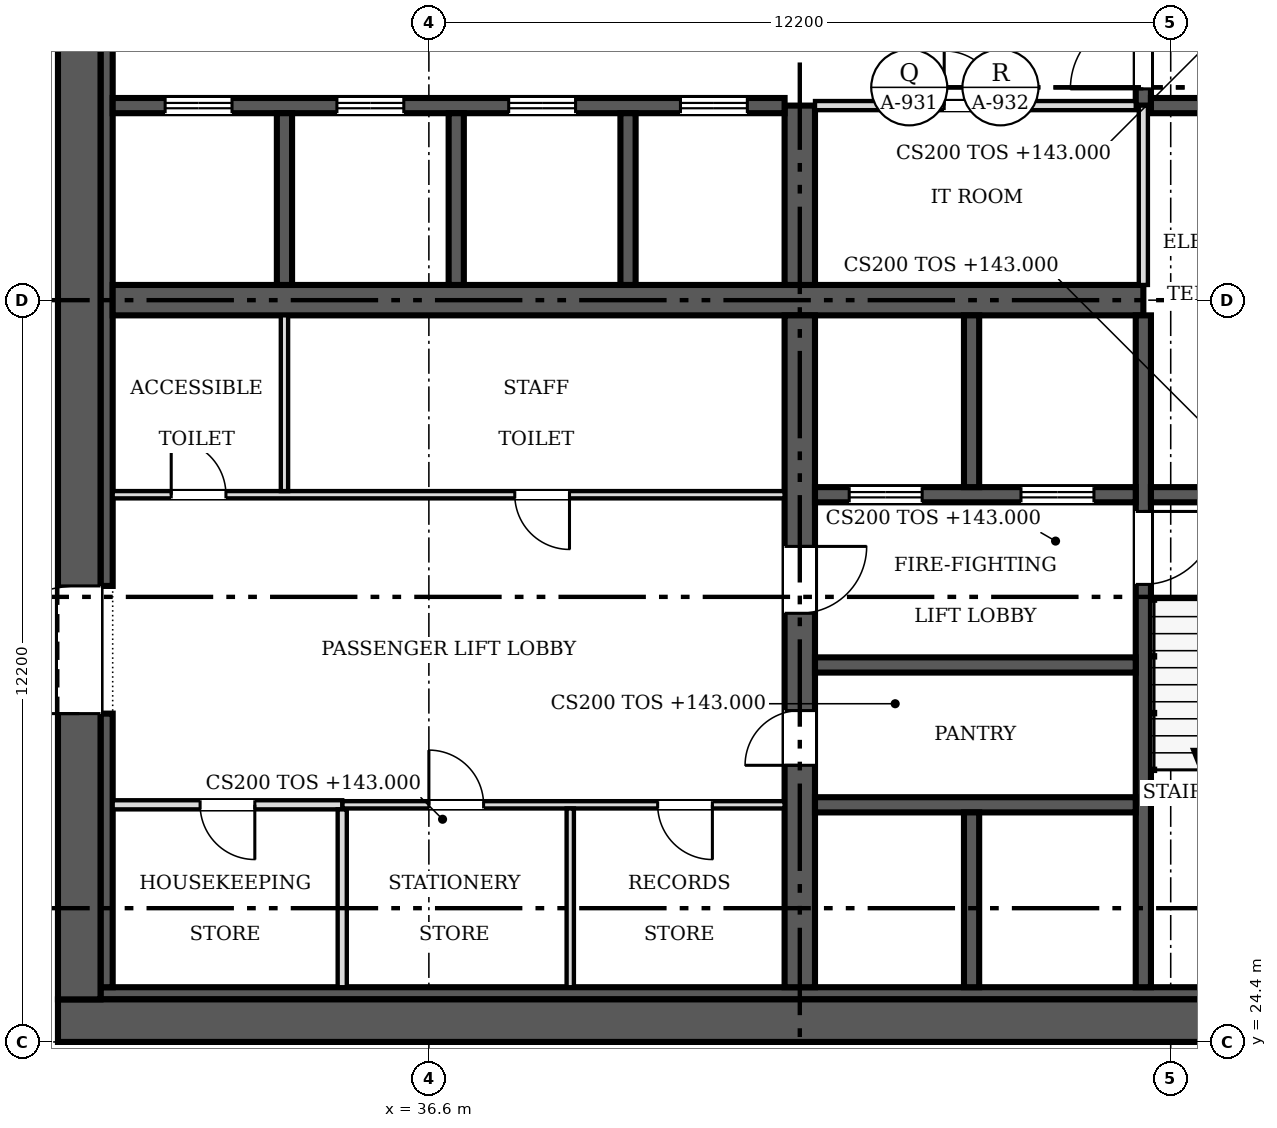
"""IFC4 building model, lengths in metres.
Left out: names, types, materials, properties, quantities, classifications, styles, units other than length and angle.
Written with IfcOpenShell. Run it as: python <this file> out.ifc"""

import sys

from ifc_helpers import new_model, si_unit, direction, frame, frame_2d, origin, place, context, subcontext, project, spatial, rectangle, extrude, source, transform, mapped, element, fill, save


model = new_model("IFC4")
c1 = context("Model", 3, precision=1e-05, world=origin(), true_north=direction((0.0, 1.0)))
c2 = subcontext(c1, "Body", "Model", "MODEL_VIEW")
j1 = project(units=[si_unit("LENGTHUNIT", "METRE"), si_unit("PLANEANGLEUNIT", "RADIAN")], contexts=[c1])
p1 = place(None, origin())
s1 = spatial("IfcSite", under=j1, at=p1, CompositionType="ELEMENT")
p2 = place(p1, origin())
s2 = spatial("IfcBuilding", under=s1, at=p2, CompositionType="ELEMENT")
p3 = place(p2, frame((0.0, 0.0, 143.0)))
s3 = spatial("IfcBuildingStorey", under=s2, at=p3, CompositionType="ELEMENT", Elevation=143.0)
p4 = place(p3, frame((54.9, 24.75, 0.0), z_axis=(0.0, 0.0, 1.0), x_axis=(-1.0, 0.0, 0.0)))
e1 = element("IfcWall", 1, at=p4, inside=s3, PredefinedType="SHEAR", context=c2, shape_type="SweptSolid", body=[
    extrude(rectangle(XDim=24.4, YDim=0.7, at=frame_2d((12.2, 0.0))), origin(), (0.0, 0.0, 1.0), 3.8),
])
m1 = source(origin(), c2, "Body", "SweptSolid", [
    extrude(rectangle(XDim=1.2, YDim=2.1, at=frame_2d((0.6, 1.05))), frame((0.0, 0.36, 0.0), z_axis=(0.0, -1.0, 0.0), x_axis=(1.0, 0.0, 0.0)), (0.0, 0.0, 1.0), 0.72),
])
p5 = place(p4, frame((1.5, 0.0, 0.0)))
e2 = element("IfcOpeningElement", 2, at=p5, cuts=e1, PredefinedType="OPENING", context=c2, shape_type="MappedRepresentation", body=[
    mapped(m1, transform((0.0, 0.0, 0.0), scale=1.0)),
])
p6 = place(p3, frame((30.85, 25.1, 0.0), z_axis=(0.0, 0.0, 1.0), x_axis=(0.0, 1.0, 0.0)))
e3 = element("IfcWall", 3, at=p6, inside=s3, PredefinedType="SHEAR", context=c2, shape_type="SweptSolid", body=[
    extrude(rectangle(XDim=23.0, YDim=0.7, at=frame_2d((11.5, 0.0))), origin(), (0.0, 0.0, 1.0), 3.8),
])
m2 = source(origin(), c2, "Body", "SweptSolid", [
    extrude(rectangle(XDim=2.1, YDim=2.4, at=frame_2d((1.05, 1.2))), frame((0.0, 0.36, 0.0), z_axis=(0.0, -1.0, 0.0), x_axis=(1.0, 0.0, 0.0)), (0.0, 0.0, 1.0), 0.72),
])
p7 = place(p6, frame((4.7, 0.0, 0.0)))
e4 = element("IfcOpeningElement", 4, at=p7, cuts=e3, PredefinedType="OPENING", context=c2, shape_type="MappedRepresentation", body=[
    mapped(m2, transform((0.0, 0.0, 0.0), scale=1.0)),
])
p8 = place(p6, frame((16.2, 0.0, 0.0)))
e5 = element("IfcOpeningElement", 5, at=p8, cuts=e3, PredefinedType="OPENING", context=c2, shape_type="MappedRepresentation", body=[
    mapped(m2, transform((0.0, 0.0, 0.0), scale=1.0)),
])
p9 = place(p3, frame((31.2, 25.2, 0.0), z_axis=(0.0, 0.0, 1.0), x_axis=(1.0, 0.0, 0.0)))
e6 = element("IfcWall", 6, at=p9, inside=s3, PredefinedType="SOLIDWALL", context=c2, shape_type="SweptSolid", body=[
    extrude(rectangle(XDim=21.0, YDim=0.2, at=frame_2d((10.5, 0.0))), origin(), (0.0, 0.0, 1.0), 3.8),
])
p10 = place(p3, frame((31.3, 25.3, 0.0), z_axis=(0.0, 0.0, 1.0), x_axis=(0.0, 1.0, 0.0)))
e7 = element("IfcWall", 7, at=p10, inside=s3, PredefinedType="SOLIDWALL", context=c2, shape_type="SweptSolid", body=[
    extrude(rectangle(XDim=4.5, YDim=0.2, at=frame_2d((2.25, 0.0))), origin(), (0.0, 0.0, 1.0), 3.8),
])
p11 = place(p3, frame((31.3, 31.9, 0.0), z_axis=(0.0, 0.0, 1.0), x_axis=(0.0, 1.0, 0.0)))
e8 = element("IfcWall", 8, at=p11, inside=s3, PredefinedType="SOLIDWALL", context=c2, shape_type="SweptSolid", body=[
    extrude(rectangle(XDim=9.4, YDim=0.2, at=frame_2d((4.7, 0.0))), origin(), (0.0, 0.0, 1.0), 3.8),
])
p12 = place(p3, frame((31.4, 36.6, 0.0), z_axis=(0.0, 0.0, 1.0), x_axis=(1.0, 0.0, 0.0)))
e9 = element("IfcWall", 9, at=p12, inside=s3, PredefinedType="SHEAR", context=c2, shape_type="SweptSolid", body=[
    extrude(rectangle(XDim=16.95, YDim=0.5, at=frame_2d((8.475, 0.0))), origin(), (0.0, 0.0, 1.0), 3.8),
])
p13 = place(p3, frame((42.7, 36.35, 0.0), z_axis=(0.0, 0.0, 1.0), x_axis=(0.0, -1.0, 0.0)))
e10 = element("IfcWall", 10, at=p13, inside=s3, PredefinedType="SHEAR", context=c2, shape_type="SweptSolid", body=[
    extrude(rectangle(XDim=11.05, YDim=0.5, at=frame_2d((5.525, 0.0))), origin(), (0.0, 0.0, 1.0), 3.8),
])
m3 = source(origin(), c2, "Body", "SweptSolid", [
    extrude(rectangle(XDim=0.9, YDim=2.1, at=frame_2d((0.45, 1.05))), frame((0.0, 0.26, 0.0), z_axis=(0.0, -1.0, 0.0), x_axis=(1.0, 0.0, 0.0)), (0.0, 0.0, 1.0), 0.52),
])
p14 = place(p13, frame((6.5, 0.0, 0.0)))
e11 = element("IfcOpeningElement", 11, at=p14, cuts=e10, PredefinedType="OPENING", context=c2, shape_type="MappedRepresentation", body=[
    mapped(m3, transform((0.0, 0.0, 0.0), scale=1.0)),
])
m4 = source(origin(), c2, "Body", "SweptSolid", [
    extrude(rectangle(XDim=1.1, YDim=2.1, at=frame_2d((0.55, 1.05))), frame((0.0, 0.26, 0.0), z_axis=(0.0, -1.0, 0.0), x_axis=(1.0, 0.0, 0.0)), (0.0, 0.0, 1.0), 0.52),
])
p15 = place(p13, frame((3.8, 0.0, 0.0)))
e12 = element("IfcOpeningElement", 12, at=p15, cuts=e10, PredefinedType="OPENING", context=c2, shape_type="MappedRepresentation", body=[
    mapped(m4, transform((0.0, 0.0, 0.0), scale=1.0)),
])
p16 = place(p3, frame((42.7, 36.85, 0.0), z_axis=(0.0, 0.0, 1.0), x_axis=(0.0, 1.0, 0.0)))
e13 = element("IfcWall", 13, at=p16, inside=s3, PredefinedType="SHEAR", context=c2, shape_type="SweptSolid", body=[
    extrude(rectangle(XDim=2.95, YDim=0.5, at=frame_2d((1.475, 0.0))), origin(), (0.0, 0.0, 1.0), 3.8),
])
p17 = place(p3, frame((31.4, 39.8, 0.0), z_axis=(0.0, 0.0, 1.0), x_axis=(1.0, 0.0, 0.0)))
e14 = element("IfcWall", 14, at=p17, inside=s3, PredefinedType="SOLIDWALL", context=c2, shape_type="SweptSolid", body=[
    extrude(rectangle(XDim=11.05, YDim=0.25, at=frame_2d((5.525, 0.0))), origin(), (0.0, 0.0, 1.0), 3.8),
])
m5 = source(origin(), c2, "Body", "SweptSolid", [
    extrude(rectangle(XDim=1.1, YDim=2.1, at=frame_2d((0.55, 1.05))), frame((0.0, 0.135, 0.0), z_axis=(0.0, -1.0, 0.0), x_axis=(1.0, 0.0, 0.0)), (0.0, 0.0, 1.0), 0.27),
])
p18 = place(p17, frame((0.863, 0.0, 0.0)))
e15 = element("IfcOpeningElement", 15, at=p18, cuts=e14, PredefinedType="OPENING", context=c2, shape_type="MappedRepresentation", body=[
    mapped(m5, transform((0.0, 0.0, 0.0), scale=1.0)),
])
p19 = place(p17, frame((3.688, 0.0, 0.0)))
e16 = element("IfcOpeningElement", 16, at=p19, cuts=e14, PredefinedType="OPENING", context=c2, shape_type="MappedRepresentation", body=[
    mapped(m5, transform((0.0, 0.0, 0.0), scale=1.0)),
])
p20 = place(p17, frame((6.512, 0.0, 0.0)))
e17 = element("IfcOpeningElement", 17, at=p20, cuts=e14, PredefinedType="OPENING", context=c2, shape_type="MappedRepresentation", body=[
    mapped(m5, transform((0.0, 0.0, 0.0), scale=1.0)),
])
p21 = place(p17, frame((9.337, 0.0, 0.0)))
e18 = element("IfcOpeningElement", 18, at=p21, cuts=e14, PredefinedType="OPENING", context=c2, shape_type="MappedRepresentation", body=[
    mapped(m5, transform((0.0, 0.0, 0.0), scale=1.0)),
])
p22 = place(p3, frame((48.35, 36.35, 0.0), z_axis=(0.0, 0.0, 1.0), x_axis=(0.0, -1.0, 0.0)))
e19 = element("IfcWall", 19, at=p22, inside=s3, PredefinedType="SOLIDWALL", context=c2, shape_type="SweptSolid", body=[
    extrude(rectangle(XDim=11.05, YDim=0.25, at=frame_2d((5.525, 0.0))), origin(), (0.0, 0.0, 1.0), 3.8),
])
m6 = source(origin(), c2, "Body", "SweptSolid", [
    extrude(rectangle(XDim=1.2, YDim=2.1, at=frame_2d((0.6, 1.05))), frame((0.0, 0.135, 0.0), z_axis=(0.0, -1.0, 0.0), x_axis=(1.0, 0.0, 0.0)), (0.0, 0.0, 1.0), 0.27),
])
p23 = place(p22, frame((3.225, 0.0, 0.0)))
e20 = element("IfcOpeningElement", 20, at=p23, cuts=e19, PredefinedType="OPENING", context=c2, shape_type="MappedRepresentation", body=[
    mapped(m6, transform((0.0, 0.0, 0.0), scale=1.0)),
])
p24 = place(p3, frame((48.225, 33.4, 0.0), z_axis=(0.0, 0.0, 1.0), x_axis=(-1.0, 0.0, 0.0)))
e21 = element("IfcWall", 21, at=p24, inside=s3, PredefinedType="SOLIDWALL", context=c2, shape_type="SweptSolid", body=[
    extrude(rectangle(XDim=5.275, YDim=0.25, at=frame_2d((2.638, 0.0))), origin(), (0.0, 0.0, 1.0), 3.8),
])
p25 = place(p24, frame((3.512, 0.0, 0.0)))
e22 = element("IfcOpeningElement", 22, at=p25, cuts=e21, PredefinedType="OPENING", context=c2, shape_type="MappedRepresentation", body=[
    mapped(m6, transform((0.0, 0.0, 0.0), scale=1.0)),
])
p26 = place(p24, frame((0.688, 0.0, 0.0)))
e23 = element("IfcOpeningElement", 23, at=p26, cuts=e21, PredefinedType="OPENING", context=c2, shape_type="MappedRepresentation", body=[
    mapped(m6, transform((0.0, 0.0, 0.0), scale=1.0)),
])
p27 = place(p3, frame((48.475, 33.4, 0.0), z_axis=(0.0, 0.0, 1.0), x_axis=(1.0, 0.0, 0.0)))
e24 = element("IfcWall", 24, at=p27, inside=s3, PredefinedType="SOLIDWALL", context=c2, shape_type="SweptSolid", body=[
    extrude(rectangle(XDim=3.525, YDim=0.25, at=frame_2d((1.762, 0.0))), origin(), (0.0, 0.0, 1.0), 3.8),
])
p28 = place(p3, frame((48.35, 47.9, 0.0), z_axis=(0.0, 0.0, 1.0), x_axis=(0.0, -1.0, 0.0)))
e25 = element("IfcWall", 25, at=p28, inside=s3, PredefinedType="SOLIDWALL", context=c2, shape_type="SweptSolid", body=[
    extrude(rectangle(XDim=8.1, YDim=0.25, at=frame_2d((4.05, 0.0))), origin(), (0.0, 0.0, 1.0), 3.8),
])
p29 = place(p28, frame((6.625, 0.0, 0.0)))
e26 = element("IfcOpeningElement", 26, at=p29, cuts=e25, PredefinedType="OPENING", context=c2, shape_type="MappedRepresentation", body=[
    mapped(m6, transform((0.0, 0.0, 0.0), scale=1.0)),
])
for number, where, z_axis, x_axis in (
    (27, (42.95, 28.3, 0.0), (0.0, 0.0, 1.0), (1.0, 0.0, 0.0)),
    (28, (42.95, 30.6, 0.0), (0.0, 0.0, 1.0), (1.0, 0.0, 0.0)),
):
    element("IfcWall", number, at=place(p3, frame(where, z_axis=z_axis, x_axis=x_axis)), inside=s3, PredefinedType="SOLIDWALL", context=c2, shape_type="SweptSolid", body=[
        extrude(rectangle(XDim=5.275, YDim=0.25, at=frame_2d((2.638, 0.0))), origin(), (0.0, 0.0, 1.0), 3.8),
    ])
p30 = place(p3, frame((48.475, 39.8, 0.0), z_axis=(0.0, 0.0, 1.0), x_axis=(1.0, 0.0, 0.0)))
e29 = element("IfcWall", 29, at=p30, inside=s3, PredefinedType="SOLIDWALL", context=c2, shape_type="SweptSolid", body=[
    extrude(rectangle(XDim=3.4, YDim=0.25, at=frame_2d((1.7, 0.0))), origin(), (0.0, 0.0, 1.0), 3.8),
])
for number, where, z_axis, x_axis in (
    (30, (34.225, 36.85, 0.0), (0.0, 0.0, 1.0), (0.0, 1.0, 0.0)),
    (31, (37.05, 36.85, 0.0), (0.0, 0.0, 1.0), (0.0, 1.0, 0.0)),
    (32, (39.875, 36.85, 0.0), (0.0, 0.0, 1.0), (0.0, 1.0, 0.0)),
):
    element("IfcWall", number, at=place(p3, frame(where, z_axis=z_axis, x_axis=x_axis)), inside=s3, PredefinedType="SOLIDWALL", context=c2, shape_type="SweptSolid", body=[
        extrude(rectangle(XDim=2.825, YDim=0.25, at=frame_2d((1.413, 0.0))), origin(), (0.0, 0.0, 1.0), 3.8),
    ])
p31 = place(p3, frame((45.525, 33.525, 0.0), z_axis=(0.0, 0.0, 1.0), x_axis=(0.0, 1.0, 0.0)))
e33 = element("IfcWall", 33, at=p31, inside=s3, PredefinedType="SOLIDWALL", context=c2, shape_type="SweptSolid", body=[
    extrude(rectangle(XDim=2.825, YDim=0.25, at=frame_2d((1.413, 0.0))), origin(), (0.0, 0.0, 1.0), 3.8),
])
p32 = place(p3, frame((45.525, 25.3, 0.0), z_axis=(0.0, 0.0, 1.0), x_axis=(0.0, 1.0, 0.0)))
e34 = element("IfcWall", 34, at=p32, inside=s3, PredefinedType="SOLIDWALL", context=c2, shape_type="SweptSolid", body=[
    extrude(rectangle(XDim=2.875, YDim=0.25, at=frame_2d((1.438, 0.0))), origin(), (0.0, 0.0, 1.0), 3.8),
])
p33 = place(p3, frame((31.4, 33.4, 0.0), z_axis=(0.0, 0.0, 1.0), x_axis=(1.0, 0.0, 0.0)))
e35 = element("IfcWall", 35, at=p33, inside=s3, PredefinedType="PARTITIONING", context=c2, shape_type="SweptSolid", body=[
    extrude(rectangle(XDim=11.05, YDim=0.12, at=frame_2d((5.525, 0.0))), origin(), (0.0, 0.0, 1.0), 3.6),
])
m7 = source(origin(), c2, "Body", "SweptSolid", [
    extrude(rectangle(XDim=0.9, YDim=2.1, at=frame_2d((0.45, 1.05))), frame((0.0, 0.07, 0.0), z_axis=(0.0, -1.0, 0.0), x_axis=(1.0, 0.0, 0.0)), (0.0, 0.0, 1.0), 0.14),
])
p34 = place(p33, frame((0.962, 0.0, 0.0)))
e36 = element("IfcOpeningElement", 36, at=p34, cuts=e35, PredefinedType="OPENING", context=c2, shape_type="MappedRepresentation", body=[
    mapped(m7, transform((0.0, 0.0, 0.0), scale=1.0)),
])
p35 = place(p33, frame((6.613, 0.0, 0.0)))
e37 = element("IfcOpeningElement", 37, at=p35, cuts=e35, PredefinedType="OPENING", context=c2, shape_type="MappedRepresentation", body=[
    mapped(m7, transform((0.0, 0.0, 0.0), scale=1.0)),
])
p36 = place(p3, frame((42.45, 28.3, 0.0), z_axis=(0.0, 0.0, 1.0), x_axis=(-1.0, 0.0, 0.0)))
e38 = element("IfcWall", 38, at=p36, inside=s3, PredefinedType="PARTITIONING", context=c2, shape_type="SweptSolid", body=[
    extrude(rectangle(XDim=7.275, YDim=0.12, at=frame_2d((3.637, 0.0))), origin(), (0.0, 0.0, 1.0), 3.6),
])
p37 = place(p36, frame((4.95, 0.0, 0.0)))
e39 = element("IfcOpeningElement", 39, at=p37, cuts=e38, PredefinedType="OPENING", context=c2, shape_type="MappedRepresentation", body=[
    mapped(m7, transform((0.0, 0.0, 0.0), scale=1.0)),
])
p38 = place(p36, frame((1.188, 0.0, 0.0)))
e40 = element("IfcOpeningElement", 40, at=p38, cuts=e38, PredefinedType="OPENING", context=c2, shape_type="MappedRepresentation", body=[
    mapped(m7, transform((0.0, 0.0, 0.0), scale=1.0)),
])
p39 = place(p3, frame((48.225, 39.8, 0.0), z_axis=(0.0, 0.0, 1.0), x_axis=(-1.0, 0.0, 0.0)))
e41 = element("IfcWall", 41, at=p39, inside=s3, PredefinedType="PARTITIONING", context=c2, shape_type="SweptSolid", body=[
    extrude(rectangle(XDim=5.275, YDim=0.15, at=frame_2d((2.638, 0.0))), origin(), (0.0, 0.0, 1.0), 3.6),
])
m8 = source(origin(), c2, "Body", "SweptSolid", [
    extrude(rectangle(XDim=0.9, YDim=2.1, at=frame_2d((0.45, 1.05))), frame((0.0, 0.085, 0.0), z_axis=(0.0, -1.0, 0.0), x_axis=(1.0, 0.0, 0.0)), (0.0, 0.0, 1.0), 0.17),
])
p40 = place(p39, frame((2.25, 0.0, 0.0)))
e42 = element("IfcOpeningElement", 42, at=p40, cuts=e41, PredefinedType="OPENING", context=c2, shape_type="MappedRepresentation", body=[
    mapped(m8, transform((0.0, 0.0, 0.0), scale=1.0)),
])
p41 = place(p3, frame((35.175, 28.3, 0.0), z_axis=(0.0, 0.0, 1.0), x_axis=(-1.0, 0.0, 0.0)))
e43 = element("IfcWall", 43, at=p41, inside=s3, PredefinedType="PARTITIONING", context=c2, shape_type="SweptSolid", body=[
    extrude(rectangle(XDim=3.775, YDim=0.15, at=frame_2d((1.888, 0.0))), origin(), (0.0, 0.0, 1.0), 3.6),
])
p42 = place(p41, frame((1.438, 0.0, 0.0)))
e44 = element("IfcOpeningElement", 44, at=p42, cuts=e43, PredefinedType="OPENING", context=c2, shape_type="MappedRepresentation", body=[
    mapped(m8, transform((0.0, 0.0, 0.0), scale=1.0)),
])
p43 = place(p3, frame((48.35, 36.85, 0.0), z_axis=(0.0, 0.0, 1.0), x_axis=(0.0, 1.0, 0.0)))
e45 = element("IfcWall", 45, at=p43, inside=s3, PredefinedType="PARTITIONING", context=c2, shape_type="SweptSolid", body=[
    extrude(rectangle(XDim=2.95, YDim=0.15, at=frame_2d((1.475, 0.0))), origin(), (0.0, 0.0, 1.0), 3.6),
])
p44 = place(p3, frame((34.225, 33.46, 0.0), z_axis=(0.0, 0.0, 1.0), x_axis=(0.0, 1.0, 0.0)))
e46 = element("IfcWall", 46, at=p44, inside=s3, PredefinedType="PARTITIONING", context=c2, shape_type="SweptSolid", body=[
    extrude(rectangle(XDim=2.89, YDim=0.12, at=frame_2d((1.445, 0.0))), origin(), (0.0, 0.0, 1.0), 3.6),
])
p45 = place(p3, frame((35.175, 25.3, 0.0), z_axis=(0.0, 0.0, 1.0), x_axis=(0.0, 1.0, 0.0)))
e47 = element("IfcWall", 47, at=p45, inside=s3, PredefinedType="PARTITIONING", context=c2, shape_type="SweptSolid", body=[
    extrude(rectangle(XDim=2.925, YDim=0.15, at=frame_2d((1.462, 0.0))), origin(), (0.0, 0.0, 1.0), 3.6),
])
p46 = place(p3, frame((38.925, 25.3, 0.0), z_axis=(0.0, 0.0, 1.0), x_axis=(0.0, 1.0, 0.0)))
e48 = element("IfcWall", 48, at=p46, inside=s3, PredefinedType="PARTITIONING", context=c2, shape_type="SweptSolid", body=[
    extrude(rectangle(XDim=2.94, YDim=0.12, at=frame_2d((1.47, 0.0))), origin(), (0.0, 0.0, 1.0), 3.6),
])
m9 = source(origin(), c2, "Body", "SweptSolid", [
    extrude(rectangle(XDim=2.1, YDim=2.4, at=frame_2d((1.05, 1.2))), frame((0.0, 0.025, 0.0), z_axis=(0.0, -1.0, 0.0), x_axis=(1.0, 0.0, 0.0)), (0.0, 0.0, 1.0), 0.05),
])
p47 = place(p7, origin())
e49 = element("IfcDoor", 49, at=p47, inside=s3, OperationType="DOUBLE_DOOR_SINGLE_SWING", PredefinedType="DOOR", context=c2, shape_type="MappedRepresentation", body=[
    mapped(m9, transform((0.0, 0.0, 0.0), scale=1.0)),
])
fill(e4, e49)
m10 = source(origin(), c2, "Body", "SweptSolid", [
    extrude(rectangle(XDim=0.9, YDim=2.1, at=frame_2d((0.45, 1.05))), frame((0.0, 0.025, 0.0), z_axis=(0.0, -1.0, 0.0), x_axis=(1.0, 0.0, 0.0)), (0.0, 0.0, 1.0), 0.05),
])
p48 = place(p14, origin())
e50 = element("IfcDoor", 50, at=p48, inside=s3, OperationType="SINGLE_SWING_RIGHT", PredefinedType="DOOR", context=c2, shape_type="MappedRepresentation", body=[
    mapped(m10, transform((0.0, 0.0, 0.0), scale=1.0)),
])
fill(e11, e50)
m11 = source(origin(), c2, "Body", "SweptSolid", [
    extrude(rectangle(XDim=1.1, YDim=2.1, at=frame_2d((0.55, 1.05))), frame((0.0, 0.025, 0.0), z_axis=(0.0, -1.0, 0.0), x_axis=(1.0, 0.0, 0.0)), (0.0, 0.0, 1.0), 0.05),
])
p49 = place(p15, origin())
e51 = element("IfcDoor", 51, at=p49, inside=s3, OperationType="SINGLE_SWING_LEFT", PredefinedType="DOOR", context=c2, shape_type="MappedRepresentation", body=[
    mapped(m11, transform((0.0, 0.0, 0.0), scale=1.0)),
])
fill(e12, e51)
p50 = place(p18, origin())
e52 = element("IfcDoor", 52, at=p50, inside=s3, OperationType="DOUBLE_DOOR_SLIDING", PredefinedType="DOOR", context=c2, shape_type="MappedRepresentation", body=[
    mapped(m11, transform((0.0, 0.0, 0.0), scale=1.0)),
])
fill(e15, e52)
p51 = place(p19, origin())
e53 = element("IfcDoor", 53, at=p51, inside=s3, OperationType="DOUBLE_DOOR_SLIDING", PredefinedType="DOOR", context=c2, shape_type="MappedRepresentation", body=[
    mapped(m11, transform((0.0, 0.0, 0.0), scale=1.0)),
])
fill(e16, e53)
p52 = place(p20, origin())
e54 = element("IfcDoor", 54, at=p52, inside=s3, OperationType="DOUBLE_DOOR_SLIDING", PredefinedType="DOOR", context=c2, shape_type="MappedRepresentation", body=[
    mapped(m11, transform((0.0, 0.0, 0.0), scale=1.0)),
])
fill(e17, e54)
p53 = place(p21, origin())
e55 = element("IfcDoor", 55, at=p53, inside=s3, OperationType="DOUBLE_DOOR_SLIDING", PredefinedType="DOOR", context=c2, shape_type="MappedRepresentation", body=[
    mapped(m11, transform((0.0, 0.0, 0.0), scale=1.0)),
])
fill(e18, e55)
m12 = source(origin(), c2, "Body", "SweptSolid", [
    extrude(rectangle(XDim=1.2, YDim=2.1, at=frame_2d((0.6, 1.05))), frame((0.0, 0.025, 0.0), z_axis=(0.0, -1.0, 0.0), x_axis=(1.0, 0.0, 0.0)), (0.0, 0.0, 1.0), 0.05),
])
p54 = place(p23, origin())
e56 = element("IfcDoor", 56, at=p54, inside=s3, OperationType="SINGLE_SWING_LEFT", PredefinedType="DOOR", context=c2, shape_type="MappedRepresentation", body=[
    mapped(m12, transform((0.0, 0.0, 0.0), scale=1.0)),
])
fill(e20, e56)
p55 = place(p25, origin())
e57 = element("IfcDoor", 57, at=p55, inside=s3, OperationType="DOUBLE_DOOR_SLIDING", PredefinedType="DOOR", context=c2, shape_type="MappedRepresentation", body=[
    mapped(m12, transform((0.0, 0.0, 0.0), scale=1.0)),
])
fill(e22, e57)
p56 = place(p26, origin())
e58 = element("IfcDoor", 58, at=p56, inside=s3, OperationType="DOUBLE_DOOR_SLIDING", PredefinedType="DOOR", context=c2, shape_type="MappedRepresentation", body=[
    mapped(m12, transform((0.0, 0.0, 0.0), scale=1.0)),
])
fill(e23, e58)
p57 = place(p29, origin())
e59 = element("IfcDoor", 59, at=p57, inside=s3, OperationType="SINGLE_SWING_RIGHT", PredefinedType="DOOR", context=c2, shape_type="MappedRepresentation", body=[
    mapped(m12, transform((0.0, 0.0, 0.0), scale=1.0)),
])
fill(e26, e59)
p58 = place(p34, origin())
e60 = element("IfcDoor", 60, at=p58, inside=s3, OperationType="SINGLE_SWING_LEFT", PredefinedType="DOOR", context=c2, shape_type="MappedRepresentation", body=[
    mapped(m10, transform((0.0, 0.0, 0.0), scale=1.0)),
])
fill(e36, e60)
p59 = place(p35, origin())
e61 = element("IfcDoor", 61, at=p59, inside=s3, OperationType="SINGLE_SWING_RIGHT", PredefinedType="DOOR", context=c2, shape_type="MappedRepresentation", body=[
    mapped(m10, transform((0.0, 0.0, 0.0), scale=1.0)),
])
fill(e37, e61)
p60 = place(p37, origin())
e62 = element("IfcDoor", 62, at=p60, inside=s3, OperationType="SINGLE_SWING_RIGHT", PredefinedType="DOOR", context=c2, shape_type="MappedRepresentation", body=[
    mapped(m10, transform((0.0, 0.0, 0.0), scale=1.0)),
])
fill(e39, e62)
p61 = place(p38, origin())
e63 = element("IfcDoor", 63, at=p61, inside=s3, OperationType="SINGLE_SWING_LEFT", PredefinedType="DOOR", context=c2, shape_type="MappedRepresentation", body=[
    mapped(m10, transform((0.0, 0.0, 0.0), scale=1.0)),
])
fill(e40, e63)
p62 = place(p40, origin())
e64 = element("IfcDoor", 64, at=p62, inside=s3, OperationType="SINGLE_SWING_RIGHT", PredefinedType="DOOR", context=c2, shape_type="MappedRepresentation", body=[
    mapped(m10, transform((0.0, 0.0, 0.0), scale=1.0)),
])
fill(e42, e64)
p63 = place(p42, origin())
e65 = element("IfcDoor", 65, at=p63, inside=s3, OperationType="SINGLE_SWING_LEFT", PredefinedType="DOOR", context=c2, shape_type="MappedRepresentation", body=[
    mapped(m10, transform((0.0, 0.0, 0.0), scale=1.0)),
])
fill(e44, e65)
save(model, sys.argv[1])
